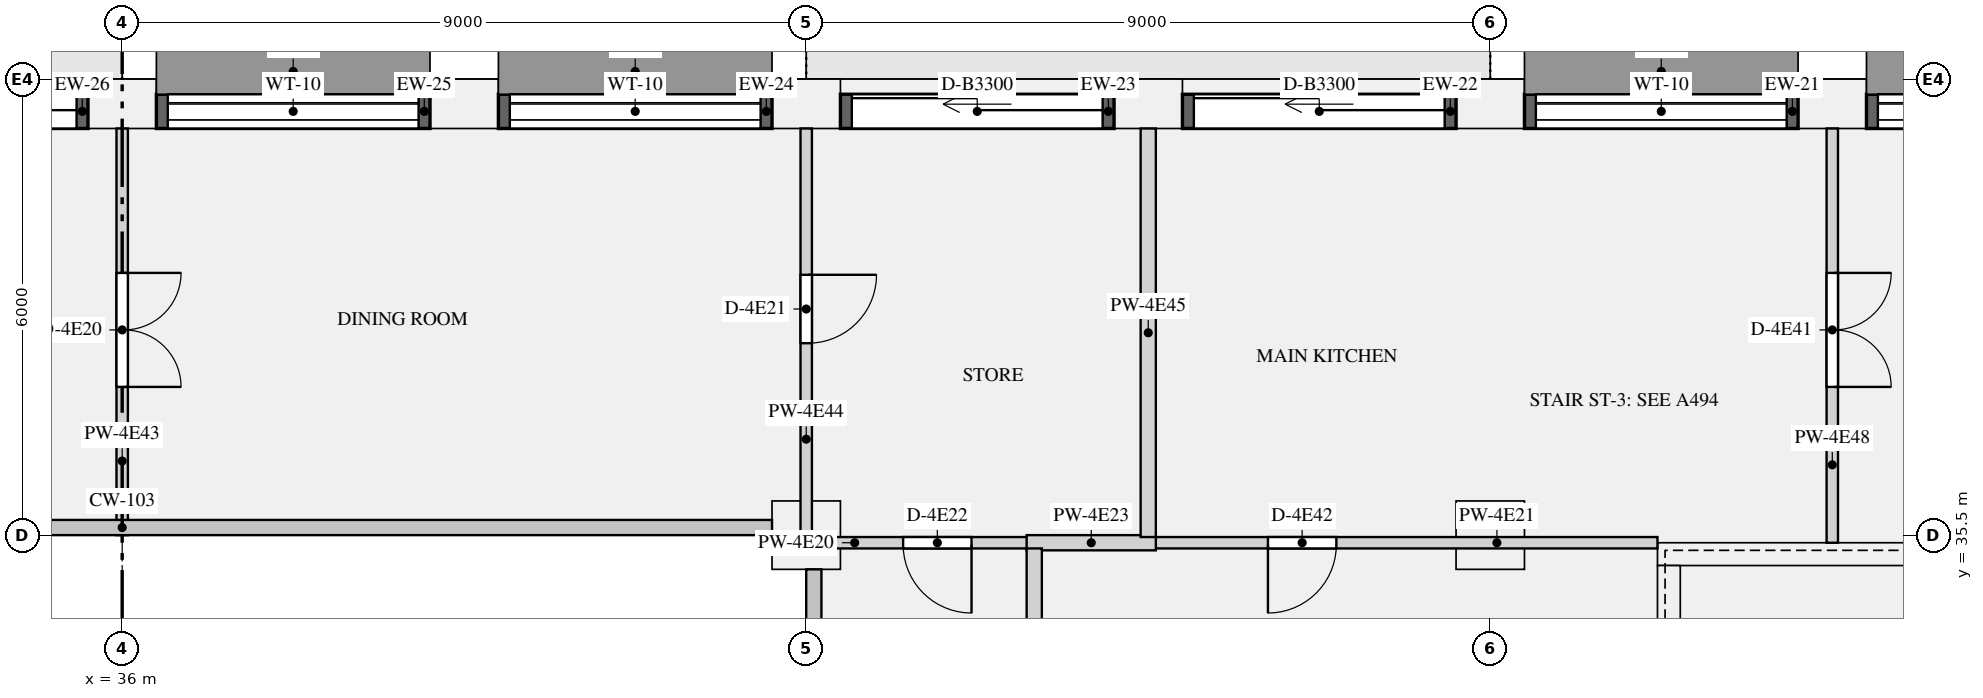
"""IFC4 building model, lengths in metres.
Left out: names, types, materials, properties, quantities, classifications, styles, units other than length and angle.
Written with IfcOpenShell. Run it as: python <this file> out.ifc"""

import sys

from ifc_helpers import new_model, si_unit, direction, frame, frame_2d, origin, origin_2d, place, context, subcontext, project, spatial, rectangle, extrude, element, fill, save


model = new_model("IFC4")
c1 = context("Model", 3, precision=1e-05, world=origin(), true_north=direction((0.0, 1.0)))
c2 = subcontext(c1, "Body", "Model", "MODEL_VIEW")
j1 = project(units=[si_unit("LENGTHUNIT", "METRE"), si_unit("PLANEANGLEUNIT", "RADIAN")], contexts=[c1])
p1 = place(None, origin())
s1 = spatial("IfcSite", under=j1, at=p1, CompositionType="ELEMENT")
p2 = place(p1, origin())
s2 = spatial("IfcBuilding", under=s1, at=p2, CompositionType="ELEMENT")
p3 = place(p2, frame((0.0, 0.0, 232.65)))
s3 = spatial("IfcBuildingStorey", under=s2, at=p3, CompositionType="ELEMENT", Elevation=232.65)
for number, where, z_axis, x_axis in (
    (1, (58.5, 41.175, 0.0), (0.0, 0.0, 1.0), (-1.0, 0.0, 0.0)),
    (2, (54.0, 41.175, 0.0), (0.0, 0.0, 1.0), (-1.0, 0.0, 0.0)),
    (3, (49.5, 41.175, 0.0), (0.0, 0.0, 1.0), (-1.0, 0.0, 0.0)),
    (4, (45.0, 41.175, 0.0), (0.0, 0.0, 1.0), (-1.0, 0.0, 0.0)),
    (5, (40.5, 41.175, 0.0), (0.0, 0.0, 1.0), (-1.0, 0.0, 0.0)),
    (6, (36.0, 41.175, 0.0), (0.0, 0.0, 1.0), (-1.0, 0.0, 0.0)),
):
    element("IfcColumn", number, at=place(p3, frame(where, z_axis=z_axis, x_axis=x_axis)), inside=s3, PredefinedType="USERDEFINED", context=c2, shape_type="SweptSolid", body=[
        extrude(rectangle(XDim=0.9, YDim=0.65, at=origin_2d()), origin(), (0.0, 0.0, 1.0), 3.15),
    ])
for number, where, z_axis, x_axis in (
    (7, (45.0, 35.5, 0.0), (0.0, 0.0, 1.0), (1.0, 0.0, 0.0)),
    (8, (54.0, 35.5, 0.0), (0.0, 0.0, 1.0), (1.0, 0.0, 0.0)),
):
    element("IfcColumn", number, at=place(p3, frame(where, z_axis=z_axis, x_axis=x_axis)), inside=s3, PredefinedType="COLUMN", context=c2, shape_type="SweptSolid", body=[
        extrude(rectangle(XDim=0.9, YDim=0.9, at=origin_2d()), origin(), (0.0, 0.0, 1.0), 3.15),
    ])
p4 = place(p3, frame((56.2, 35.25, 0.0), z_axis=(0.0, 0.0, 1.0), x_axis=(1.0, 0.0, 0.0)))
e9 = element("IfcWall", 9, at=p4, inside=s3, PredefinedType="SHEAR", context=c2, shape_type="SweptSolid", body=[
    extrude(rectangle(XDim=3.6, YDim=0.3, at=frame_2d((1.8, 0.0))), origin(), (0.0, 0.0, 1.0), 3.15),
])
p5 = place(p3, frame((56.35, 27.3, 0.0), z_axis=(0.0, 0.0, 1.0), x_axis=(0.0, 1.0, 0.0)))
e10 = element("IfcWall", 10, at=p5, inside=s3, PredefinedType="SHEAR", context=c2, shape_type="SweptSolid", body=[
    extrude(rectangle(XDim=7.8, YDim=0.3, at=frame_2d((3.9, 0.0))), origin(), (0.0, 0.0, 1.0), 3.15),
])
p6 = place(p3, frame((62.55, 41.075, 0.9), z_axis=(0.0, 0.0, 1.0), x_axis=(-1.0, 0.0, 0.0)))
e11 = element("IfcWall", 11, at=p6, inside=s3, PredefinedType="SOLIDWALL", context=c2, shape_type="SweptSolid", body=[
    extrude(rectangle(XDim=3.6, YDim=0.45, at=frame_2d((1.8, 0.0))), origin(), (0.0, 0.0, 1.0), 1.9),
])
p7 = place(p6, frame((0.15, 0.0, 0.15)))
e12 = element("IfcOpeningElement", 12, at=p7, cuts=e11, PredefinedType="OPENING", context=c2, shape_type="SweptSolid", body=[
    extrude(rectangle(XDim=3.3, YDim=1.5, at=frame_2d((1.65, 0.75))), frame((0.0, 0.235, 0.0), z_axis=(0.0, -1.0, 0.0), x_axis=(1.0, 0.0, 0.0)), (0.0, 0.0, 1.0), 0.47),
])
p8 = place(p3, frame((58.05, 41.075, 0.9), z_axis=(0.0, 0.0, 1.0), x_axis=(-1.0, 0.0, 0.0)))
e13 = element("IfcWall", 13, at=p8, inside=s3, PredefinedType="SOLIDWALL", context=c2, shape_type="SweptSolid", body=[
    extrude(rectangle(XDim=3.6, YDim=0.45, at=frame_2d((1.8, 0.0))), origin(), (0.0, 0.0, 1.0), 1.9),
])
p9 = place(p8, frame((0.15, 0.0, 0.15)))
e14 = element("IfcOpeningElement", 14, at=p9, cuts=e13, PredefinedType="OPENING", context=c2, shape_type="SweptSolid", body=[
    extrude(rectangle(XDim=3.3, YDim=1.5, at=frame_2d((1.65, 0.75))), frame((0.0, 0.235, 0.0), z_axis=(0.0, -1.0, 0.0), x_axis=(1.0, 0.0, 0.0)), (0.0, 0.0, 1.0), 0.47),
])
p10 = place(p3, frame((53.55, 41.075, 0.0), z_axis=(0.0, 0.0, 1.0), x_axis=(-1.0, 0.0, 0.0)))
e15 = element("IfcWall", 15, at=p10, inside=s3, PredefinedType="SOLIDWALL", context=c2, shape_type="SweptSolid", body=[
    extrude(rectangle(XDim=3.6, YDim=0.45, at=frame_2d((1.8, 0.0))), origin(), (0.0, 0.0, 1.0), 2.8),
])
p11 = place(p10, frame((0.15, 0.0, 0.0)))
e16 = element("IfcOpeningElement", 16, at=p11, cuts=e15, PredefinedType="OPENING", context=c2, shape_type="SweptSolid", body=[
    extrude(rectangle(XDim=3.3, YDim=2.3, at=frame_2d((1.65, 1.15))), frame((0.0, 0.235, 0.0), z_axis=(0.0, -1.0, 0.0), x_axis=(1.0, 0.0, 0.0)), (0.0, 0.0, 1.0), 0.47),
])
p12 = place(p3, frame((49.05, 41.075, 0.0), z_axis=(0.0, 0.0, 1.0), x_axis=(-1.0, 0.0, 0.0)))
e17 = element("IfcWall", 17, at=p12, inside=s3, PredefinedType="SOLIDWALL", context=c2, shape_type="SweptSolid", body=[
    extrude(rectangle(XDim=3.6, YDim=0.45, at=frame_2d((1.8, 0.0))), origin(), (0.0, 0.0, 1.0), 2.8),
])
p13 = place(p12, frame((0.15, 0.0, 0.0)))
e18 = element("IfcOpeningElement", 18, at=p13, cuts=e17, PredefinedType="OPENING", context=c2, shape_type="SweptSolid", body=[
    extrude(rectangle(XDim=3.3, YDim=2.3, at=frame_2d((1.65, 1.15))), frame((0.0, 0.235, 0.0), z_axis=(0.0, -1.0, 0.0), x_axis=(1.0, 0.0, 0.0)), (0.0, 0.0, 1.0), 0.47),
])
p14 = place(p3, frame((44.55, 41.075, 0.9), z_axis=(0.0, 0.0, 1.0), x_axis=(-1.0, 0.0, 0.0)))
e19 = element("IfcWall", 19, at=p14, inside=s3, PredefinedType="SOLIDWALL", context=c2, shape_type="SweptSolid", body=[
    extrude(rectangle(XDim=3.6, YDim=0.45, at=frame_2d((1.8, 0.0))), origin(), (0.0, 0.0, 1.0), 1.9),
])
p15 = place(p14, frame((0.15, 0.0, 0.15)))
e20 = element("IfcOpeningElement", 20, at=p15, cuts=e19, PredefinedType="OPENING", context=c2, shape_type="SweptSolid", body=[
    extrude(rectangle(XDim=3.3, YDim=1.5, at=frame_2d((1.65, 0.75))), frame((0.0, 0.235, 0.0), z_axis=(0.0, -1.0, 0.0), x_axis=(1.0, 0.0, 0.0)), (0.0, 0.0, 1.0), 0.47),
])
p16 = place(p3, frame((40.05, 41.075, 0.9), z_axis=(0.0, 0.0, 1.0), x_axis=(-1.0, 0.0, 0.0)))
e21 = element("IfcWall", 21, at=p16, inside=s3, PredefinedType="SOLIDWALL", context=c2, shape_type="SweptSolid", body=[
    extrude(rectangle(XDim=3.6, YDim=0.45, at=frame_2d((1.8, 0.0))), origin(), (0.0, 0.0, 1.0), 1.9),
])
p17 = place(p16, frame((0.15, 0.0, 0.15)))
e22 = element("IfcOpeningElement", 22, at=p17, cuts=e21, PredefinedType="OPENING", context=c2, shape_type="SweptSolid", body=[
    extrude(rectangle(XDim=3.3, YDim=1.5, at=frame_2d((1.65, 0.75))), frame((0.0, 0.235, 0.0), z_axis=(0.0, -1.0, 0.0), x_axis=(1.0, 0.0, 0.0)), (0.0, 0.0, 1.0), 0.47),
])
p18 = place(p3, frame((35.55, 41.075, 0.0), z_axis=(0.0, 0.0, 1.0), x_axis=(-1.0, 0.0, 0.0)))
e23 = element("IfcWall", 23, at=p18, inside=s3, PredefinedType="SOLIDWALL", context=c2, shape_type="SweptSolid", body=[
    extrude(rectangle(XDim=3.6, YDim=0.45, at=frame_2d((1.8, 0.0))), origin(), (0.0, 0.0, 1.0), 2.8),
])
p19 = place(p18, frame((0.15, 0.0, 0.0)))
e24 = element("IfcOpeningElement", 24, at=p19, cuts=e23, PredefinedType="OPENING", context=c2, shape_type="SweptSolid", body=[
    extrude(rectangle(XDim=3.3, YDim=2.3, at=frame_2d((1.65, 1.15))), frame((0.0, 0.235, 0.0), z_axis=(0.0, -1.0, 0.0), x_axis=(1.0, 0.0, 0.0)), (0.0, 0.0, 1.0), 0.47),
])
p20 = place(p3, frame((45.0, 35.4, 0.0), z_axis=(0.0, 0.0, 1.0), x_axis=(1.0, 0.0, 0.0)))
e25 = element("IfcWall", 25, at=p20, inside=s3, PredefinedType="PARTITIONING", context=c2, shape_type="SweptSolid", body=[
    extrude(rectangle(XDim=3.1, YDim=0.15, at=frame_2d((1.55, 0.0))), origin(), (0.0, 0.0, 1.0), 2.8),
])
p21 = place(p20, frame((1.275, 0.0, 0.0)))
e26 = element("IfcOpeningElement", 26, at=p21, cuts=e25, PredefinedType="OPENING", context=c2, shape_type="SweptSolid", body=[
    extrude(rectangle(XDim=0.9, YDim=2.1, at=frame_2d((0.45, 1.05))), frame((0.0, 0.085, 0.0), z_axis=(0.0, -1.0, 0.0), x_axis=(1.0, 0.0, 0.0)), (0.0, 0.0, 1.0), 0.17),
])
p22 = place(p3, frame((49.4, 35.4, 0.0), z_axis=(0.0, 0.0, 1.0), x_axis=(1.0, 0.0, 0.0)))
e27 = element("IfcWall", 27, at=p22, inside=s3, PredefinedType="PARTITIONING", context=c2, shape_type="SweptSolid", body=[
    extrude(rectangle(XDim=6.8, YDim=0.15, at=frame_2d((3.4, 0.0))), origin(), (0.0, 0.0, 1.0), 2.8),
])
p23 = place(p22, frame((1.675, 0.0, 0.0)))
e28 = element("IfcOpeningElement", 28, at=p23, cuts=e27, PredefinedType="OPENING", context=c2, shape_type="SweptSolid", body=[
    extrude(rectangle(XDim=0.9, YDim=2.1, at=frame_2d((0.45, 1.05))), frame((0.0, 0.085, 0.0), z_axis=(0.0, -1.0, 0.0), x_axis=(1.0, 0.0, 0.0)), (0.0, 0.0, 1.0), 0.17),
])
p24 = place(p3, frame((47.9, 35.4, 0.0), z_axis=(0.0, 0.0, 1.0), x_axis=(1.0, 0.0, 0.0)))
e29 = element("IfcWall", 29, at=p24, inside=s3, PredefinedType="PARTITIONING", context=c2, shape_type="SweptSolid", body=[
    extrude(rectangle(XDim=1.7, YDim=0.2, at=frame_2d((0.85, 0.0))), origin(), (0.0, 0.0, 1.0), 2.8),
])
p25 = place(p3, frame((48.0, 24.1, 0.0), z_axis=(0.0, 0.0, 1.0), x_axis=(0.0, 1.0, 0.0)))
e30 = element("IfcWall", 30, at=p25, inside=s3, PredefinedType="PARTITIONING", context=c2, shape_type="SweptSolid", body=[
    extrude(rectangle(XDim=11.225, YDim=0.2, at=frame_2d((5.612, 0.0))), origin(), (0.0, 0.0, 1.0), 2.8),
])
p26 = place(p3, frame((36.0, 35.5, 0.0), z_axis=(0.0, 0.0, 1.0), x_axis=(0.0, 1.0, 0.0)))
e31 = element("IfcWall", 31, at=p26, inside=s3, PredefinedType="PARTITIONING", context=c2, shape_type="SweptSolid", body=[
    extrude(rectangle(XDim=5.35, YDim=0.15, at=frame_2d((2.675, 0.0))), origin(), (0.0, 0.0, 1.0), 2.8),
])
p27 = place(p26, frame((1.95, 0.0, 0.0)))
e32 = element("IfcOpeningElement", 32, at=p27, cuts=e31, PredefinedType="OPENING", context=c2, shape_type="SweptSolid", body=[
    extrude(rectangle(XDim=1.5, YDim=2.1, at=frame_2d((0.75, 1.05))), frame((0.0, 0.085, 0.0), z_axis=(0.0, -1.0, 0.0), x_axis=(1.0, 0.0, 0.0)), (0.0, 0.0, 1.0), 0.17),
])
p28 = place(p3, frame((45.0, 35.5, 0.0), z_axis=(0.0, 0.0, 1.0), x_axis=(0.0, 1.0, 0.0)))
e33 = element("IfcWall", 33, at=p28, inside=s3, PredefinedType="PARTITIONING", context=c2, shape_type="SweptSolid", body=[
    extrude(rectangle(XDim=5.35, YDim=0.15, at=frame_2d((2.675, 0.0))), origin(), (0.0, 0.0, 1.0), 2.8),
])
p29 = place(p28, frame((2.525, 0.0, 0.0)))
e34 = element("IfcOpeningElement", 34, at=p29, cuts=e33, PredefinedType="OPENING", context=c2, shape_type="SweptSolid", body=[
    extrude(rectangle(XDim=0.9, YDim=2.1, at=frame_2d((0.45, 1.05))), frame((0.0, 0.085, 0.0), z_axis=(0.0, -1.0, 0.0), x_axis=(1.0, 0.0, 0.0)), (0.0, 0.0, 1.0), 0.17),
])
p30 = place(p3, frame((49.5, 35.475, 0.0), z_axis=(0.0, 0.0, 1.0), x_axis=(0.0, 1.0, 0.0)))
e35 = element("IfcWall", 35, at=p30, inside=s3, PredefinedType="PARTITIONING", context=c2, shape_type="SweptSolid", body=[
    extrude(rectangle(XDim=5.375, YDim=0.2, at=frame_2d((2.688, 0.0))), origin(), (0.0, 0.0, 1.0), 2.8),
])
p31 = place(p3, frame((58.5, 35.4, 0.0), z_axis=(0.0, 0.0, 1.0), x_axis=(0.0, 1.0, 0.0)))
e36 = element("IfcWall", 36, at=p31, inside=s3, PredefinedType="PARTITIONING", context=c2, shape_type="SweptSolid", body=[
    extrude(rectangle(XDim=5.45, YDim=0.15, at=frame_2d((2.725, 0.0))), origin(), (0.0, 0.0, 1.0), 2.8),
])
p32 = place(p31, frame((2.05, 0.0, 0.0)))
e37 = element("IfcOpeningElement", 37, at=p32, cuts=e36, PredefinedType="OPENING", context=c2, shape_type="SweptSolid", body=[
    extrude(rectangle(XDim=1.5, YDim=2.1, at=frame_2d((0.75, 1.05))), frame((0.0, 0.085, 0.0), z_axis=(0.0, -1.0, 0.0), x_axis=(1.0, 0.0, 0.0)), (0.0, 0.0, 1.0), 0.17),
])
p33 = place(p7, origin())
e38 = element("IfcWindow", 38, at=p33, inside=s3, PartitioningType="SINGLE_PANEL", PredefinedType="WINDOW", context=c2, shape_type="SweptSolid", body=[
    extrude(rectangle(XDim=3.3, YDim=1.5, at=frame_2d((1.65, 0.75))), frame((0.0, -0.065, 0.0), z_axis=(0.0, -1.0, 0.0), x_axis=(1.0, 0.0, 0.0)), (0.0, 0.0, 1.0), 0.06),
])
fill(e12, e38)
p34 = place(p9, origin())
e39 = element("IfcWindow", 39, at=p34, inside=s3, PartitioningType="SINGLE_PANEL", PredefinedType="WINDOW", context=c2, shape_type="SweptSolid", body=[
    extrude(rectangle(XDim=3.3, YDim=1.5, at=frame_2d((1.65, 0.75))), frame((0.0, -0.065, 0.0), z_axis=(0.0, -1.0, 0.0), x_axis=(1.0, 0.0, 0.0)), (0.0, 0.0, 1.0), 0.06),
])
fill(e14, e39)
p35 = place(p11, origin())
e40 = element("IfcDoor", 40, at=p35, inside=s3, OperationType="SLIDING_TO_LEFT", PredefinedType="DOOR", context=c2, shape_type="SweptSolid", body=[
    extrude(rectangle(XDim=3.3, YDim=2.3, at=frame_2d((1.65, 1.15))), frame((0.0, -0.07, 0.0), z_axis=(0.0, -1.0, 0.0), x_axis=(1.0, 0.0, 0.0)), (0.0, 0.0, 1.0), 0.05),
])
fill(e16, e40)
p36 = place(p13, origin())
e41 = element("IfcDoor", 41, at=p36, inside=s3, OperationType="SLIDING_TO_LEFT", PredefinedType="DOOR", context=c2, shape_type="SweptSolid", body=[
    extrude(rectangle(XDim=3.3, YDim=2.3, at=frame_2d((1.65, 1.15))), frame((0.0, -0.07, 0.0), z_axis=(0.0, -1.0, 0.0), x_axis=(1.0, 0.0, 0.0)), (0.0, 0.0, 1.0), 0.05),
])
fill(e18, e41)
p37 = place(p15, origin())
e42 = element("IfcWindow", 42, at=p37, inside=s3, PartitioningType="SINGLE_PANEL", PredefinedType="WINDOW", context=c2, shape_type="SweptSolid", body=[
    extrude(rectangle(XDim=3.3, YDim=1.5, at=frame_2d((1.65, 0.75))), frame((0.0, -0.065, 0.0), z_axis=(0.0, -1.0, 0.0), x_axis=(1.0, 0.0, 0.0)), (0.0, 0.0, 1.0), 0.06),
])
fill(e20, e42)
p38 = place(p17, origin())
e43 = element("IfcWindow", 43, at=p38, inside=s3, PartitioningType="SINGLE_PANEL", PredefinedType="WINDOW", context=c2, shape_type="SweptSolid", body=[
    extrude(rectangle(XDim=3.3, YDim=1.5, at=frame_2d((1.65, 0.75))), frame((0.0, -0.065, 0.0), z_axis=(0.0, -1.0, 0.0), x_axis=(1.0, 0.0, 0.0)), (0.0, 0.0, 1.0), 0.06),
])
fill(e22, e43)
p39 = place(p19, origin())
e44 = element("IfcDoor", 44, at=p39, inside=s3, OperationType="SLIDING_TO_LEFT", PredefinedType="DOOR", context=c2, shape_type="SweptSolid", body=[
    extrude(rectangle(XDim=3.3, YDim=2.3, at=frame_2d((1.65, 1.15))), frame((0.0, -0.07, 0.0), z_axis=(0.0, -1.0, 0.0), x_axis=(1.0, 0.0, 0.0)), (0.0, 0.0, 1.0), 0.05),
])
fill(e24, e44)
p40 = place(p27, frame((1.5, 0.0, 0.0), z_axis=(0.0, 0.0, 1.0), x_axis=(-1.0, 0.0, 0.0)))
e45 = element("IfcDoor", 45, at=p40, inside=s3, OperationType="DOUBLE_DOOR_SINGLE_SWING", PredefinedType="DOOR", context=c2, shape_type="SweptSolid", body=[
    extrude(rectangle(XDim=1.5, YDim=2.1, at=frame_2d((0.75, 1.05))), frame((0.0, 0.025, 0.0), z_axis=(0.0, -1.0, 0.0), x_axis=(1.0, 0.0, 0.0)), (0.0, 0.0, 1.0), 0.05),
])
fill(e32, e45)
p41 = place(p29, frame((0.9, 0.0, 0.0), z_axis=(0.0, 0.0, 1.0), x_axis=(-1.0, 0.0, 0.0)))
e46 = element("IfcDoor", 46, at=p41, inside=s3, OperationType="SINGLE_SWING_LEFT", PredefinedType="DOOR", context=c2, shape_type="SweptSolid", body=[
    extrude(rectangle(XDim=0.9, YDim=2.1, at=frame_2d((0.45, 1.05))), frame((0.0, 0.025, 0.0), z_axis=(0.0, -1.0, 0.0), x_axis=(1.0, 0.0, 0.0)), (0.0, 0.0, 1.0), 0.05),
])
fill(e34, e46)
p42 = place(p21, frame((0.9, 0.0, 0.0), z_axis=(0.0, 0.0, 1.0), x_axis=(-1.0, 0.0, 0.0)))
e47 = element("IfcDoor", 47, at=p42, inside=s3, OperationType="SINGLE_SWING_LEFT", PredefinedType="DOOR", context=c2, shape_type="SweptSolid", body=[
    extrude(rectangle(XDim=0.9, YDim=2.1, at=frame_2d((0.45, 1.05))), frame((0.0, 0.025, 0.0), z_axis=(0.0, -1.0, 0.0), x_axis=(1.0, 0.0, 0.0)), (0.0, 0.0, 1.0), 0.05),
])
fill(e26, e47)
p43 = place(p32, frame((1.5, 0.0, 0.0), z_axis=(0.0, 0.0, 1.0), x_axis=(-1.0, 0.0, 0.0)))
e48 = element("IfcDoor", 48, at=p43, inside=s3, OperationType="DOUBLE_DOOR_SINGLE_SWING", PredefinedType="DOOR", context=c2, shape_type="SweptSolid", body=[
    extrude(rectangle(XDim=1.5, YDim=2.1, at=frame_2d((0.75, 1.05))), frame((0.0, 0.025, 0.0), z_axis=(0.0, -1.0, 0.0), x_axis=(1.0, 0.0, 0.0)), (0.0, 0.0, 1.0), 0.05),
])
fill(e37, e48)
p44 = place(p23, frame((0.9, 0.0, 0.0), z_axis=(0.0, 0.0, 1.0), x_axis=(-1.0, 0.0, 0.0)))
e49 = element("IfcDoor", 49, at=p44, inside=s3, OperationType="SINGLE_SWING_RIGHT", PredefinedType="DOOR", context=c2, shape_type="SweptSolid", body=[
    extrude(rectangle(XDim=0.9, YDim=2.1, at=frame_2d((0.45, 1.05))), frame((0.0, 0.025, 0.0), z_axis=(0.0, -1.0, 0.0), x_axis=(1.0, 0.0, 0.0)), (0.0, 0.0, 1.0), 0.05),
])
fill(e28, e49)
save(model, sys.argv[1])
